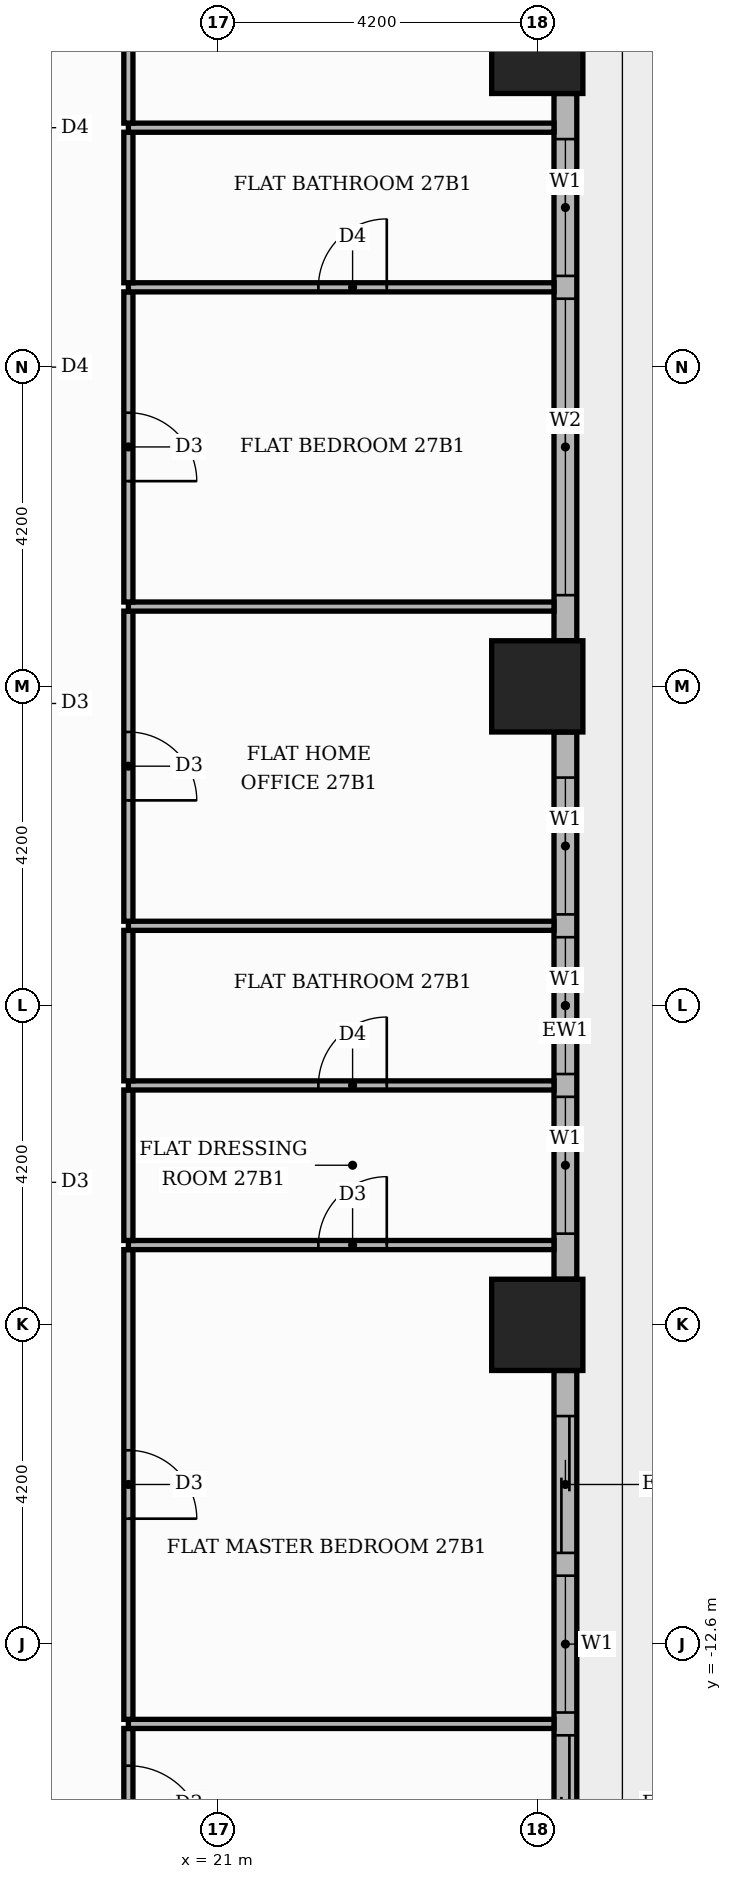
"""IFC4 building model, lengths in metres.
Left out: names, types, materials, properties, quantities, classifications, styles, units other than length and angle.
Written with IfcOpenShell. Run it as: python <this file> out.ifc"""

import sys

from ifc_helpers import new_model, si_unit, direction, frame, frame_2d, origin, origin_2d, place, context, subcontext, project, spatial, rectangle, extrude, element, fill, save


model = new_model("IFC4")
c1 = context("Model", 3, precision=1e-05, world=origin(), true_north=direction((0.0, 1.0)))
c2 = subcontext(c1, "Body", "Model", "MODEL_VIEW")
j1 = project(units=[si_unit("LENGTHUNIT", "METRE"), si_unit("PLANEANGLEUNIT", "RADIAN")], contexts=[c1])
p1 = place(None, origin())
s1 = spatial("IfcSite", under=j1, at=p1, CompositionType="ELEMENT")
p2 = place(p1, origin())
s2 = spatial("IfcBuilding", under=s1, at=p2, CompositionType="ELEMENT")
p3 = place(p2, frame((0.0, 0.0, 114.3)))
s3 = spatial("IfcBuildingStorey", under=s2, at=p3, CompositionType="ELEMENT", Elevation=114.3)
for number, where, z_axis, x_axis in (
    (1, (25.2, 0.0, 0.0), (0.0, 0.0, 1.0), (1.0, 0.0, 0.0)),
    (2, (25.2, 8.4, 0.0), (0.0, 0.0, 1.0), (1.0, 0.0, 0.0)),
    (3, (25.2, -8.4, 0.0), (0.0, 0.0, 1.0), (1.0, 0.0, 0.0)),
):
    element("IfcColumn", number, at=place(p3, frame(where, z_axis=z_axis, x_axis=x_axis)), inside=s3, PredefinedType="COLUMN", context=c2, shape_type="SweptSolid", body=[
        extrude(rectangle(XDim=1.2, YDim=1.2, at=origin_2d()), origin(), (0.0, 0.0, 1.0), 3.9),
    ])
p4 = place(p3, frame((25.57, -16.2, 0.0), z_axis=(0.0, 0.0, 1.0), x_axis=(0.0, 1.0, 0.0)))
e4 = element("IfcWall", 4, at=p4, inside=s3, PredefinedType="STANDARD", context=c2, shape_type="SweptSolid", body=[
    extrude(rectangle(XDim=7.2, YDim=0.3, at=frame_2d((3.6, 0.0))), origin(), (0.0, 0.0, 1.0), 3.48),
])
p5 = place(p4, frame((0.6, 0.0, 0.0)))
e5 = element("IfcOpeningElement", 5, at=p5, cuts=e4, PredefinedType="OPENING", context=c2, shape_type="SweptSolid", body=[
    extrude(rectangle(XDim=1.8, YDim=2.4, at=frame_2d((0.9, 1.2))), frame((0.0, 0.16, 0.0), z_axis=(0.0, -1.0, 0.0), x_axis=(1.0, 0.0, 0.0)), (0.0, 0.0, 1.0), 0.32),
])
p6 = place(p4, frame((2.7, 0.0, 0.9)))
e6 = element("IfcOpeningElement", 6, at=p6, cuts=e4, PredefinedType="OPENING", context=c2, shape_type="SweptSolid", body=[
    extrude(rectangle(XDim=1.8, YDim=2.1, at=frame_2d((0.9, 1.05))), frame((0.0, 0.16, 0.0), z_axis=(0.0, -1.0, 0.0), x_axis=(1.0, 0.0, 0.0)), (0.0, 0.0, 1.0), 0.32),
])
p7 = place(p4, frame((4.8, 0.0, 0.0)))
e7 = element("IfcOpeningElement", 7, at=p7, cuts=e4, PredefinedType="OPENING", context=c2, shape_type="SweptSolid", body=[
    extrude(rectangle(XDim=1.8, YDim=2.4, at=frame_2d((0.9, 1.2))), frame((0.0, 0.16, 0.0), z_axis=(0.0, -1.0, 0.0), x_axis=(1.0, 0.0, 0.0)), (0.0, 0.0, 1.0), 0.32),
])
p8 = place(p3, frame((25.57, -7.8, 0.0), z_axis=(0.0, 0.0, 1.0), x_axis=(0.0, 1.0, 0.0)))
e8 = element("IfcWall", 8, at=p8, inside=s3, PredefinedType="STANDARD", context=c2, shape_type="SweptSolid", body=[
    extrude(rectangle(XDim=7.2, YDim=0.3, at=frame_2d((3.6, 0.0))), origin(), (0.0, 0.0, 1.0), 3.48),
])
p9 = place(p8, frame((0.6, 0.0, 0.9)))
e9 = element("IfcOpeningElement", 9, at=p9, cuts=e8, PredefinedType="OPENING", context=c2, shape_type="SweptSolid", body=[
    extrude(rectangle(XDim=1.8, YDim=2.1, at=frame_2d((0.9, 1.05))), frame((0.0, 0.16, 0.0), z_axis=(0.0, -1.0, 0.0), x_axis=(1.0, 0.0, 0.0)), (0.0, 0.0, 1.0), 0.32),
])
p10 = place(p8, frame((2.7, 0.0, 0.9)))
e10 = element("IfcOpeningElement", 10, at=p10, cuts=e8, PredefinedType="OPENING", context=c2, shape_type="SweptSolid", body=[
    extrude(rectangle(XDim=1.8, YDim=2.1, at=frame_2d((0.9, 1.05))), frame((0.0, 0.16, 0.0), z_axis=(0.0, -1.0, 0.0), x_axis=(1.0, 0.0, 0.0)), (0.0, 0.0, 1.0), 0.32),
])
p11 = place(p8, frame((4.8, 0.0, 0.9)))
e11 = element("IfcOpeningElement", 11, at=p11, cuts=e8, PredefinedType="OPENING", context=c2, shape_type="SweptSolid", body=[
    extrude(rectangle(XDim=1.8, YDim=2.1, at=frame_2d((0.9, 1.05))), frame((0.0, 0.16, 0.0), z_axis=(0.0, -1.0, 0.0), x_axis=(1.0, 0.0, 0.0)), (0.0, 0.0, 1.0), 0.32),
])
p12 = place(p3, frame((25.57, 0.6, 0.0), z_axis=(0.0, 0.0, 1.0), x_axis=(0.0, 1.0, 0.0)))
e12 = element("IfcWall", 12, at=p12, inside=s3, PredefinedType="STANDARD", context=c2, shape_type="SweptSolid", body=[
    extrude(rectangle(XDim=7.2, YDim=0.3, at=frame_2d((3.6, 0.0))), origin(), (0.0, 0.0, 1.0), 3.48),
])
p13 = place(p12, frame((0.6, 0.0, 0.9)))
e13 = element("IfcOpeningElement", 13, at=p13, cuts=e12, PredefinedType="OPENING", context=c2, shape_type="SweptSolid", body=[
    extrude(rectangle(XDim=3.9, YDim=2.1, at=frame_2d((1.95, 1.05))), frame((0.0, 0.16, 0.0), z_axis=(0.0, -1.0, 0.0), x_axis=(1.0, 0.0, 0.0)), (0.0, 0.0, 1.0), 0.32),
])
p14 = place(p12, frame((4.8, 0.0, 0.9)))
e14 = element("IfcOpeningElement", 14, at=p14, cuts=e12, PredefinedType="OPENING", context=c2, shape_type="SweptSolid", body=[
    extrude(rectangle(XDim=1.8, YDim=2.1, at=frame_2d((0.9, 1.05))), frame((0.0, 0.16, 0.0), z_axis=(0.0, -1.0, 0.0), x_axis=(1.0, 0.0, 0.0)), (0.0, 0.0, 1.0), 0.32),
])
p15 = place(p3, frame((19.82, -15.69, 0.0), z_axis=(0.0, 0.0, 1.0), x_axis=(0.0, 1.0, 0.0)))
e15 = element("IfcWall", 15, at=p15, inside=s3, PredefinedType="PARTITIONING", context=c2, shape_type="SweptSolid", body=[
    extrude(rectangle(XDim=1.98, YDim=0.12, at=frame_2d((0.99, 0.0))), origin(), (0.0, 0.0, 1.0), 3.48),
])
p16 = place(p15, frame((0.49, 0.0, 0.0)))
e16 = element("IfcOpeningElement", 16, at=p16, cuts=e15, PredefinedType="OPENING", context=c2, shape_type="SweptSolid", body=[
    extrude(rectangle(XDim=1.0, YDim=2.1, at=frame_2d((0.5, 1.05))), frame((0.0, 0.07, 0.0), z_axis=(0.0, -1.0, 0.0), x_axis=(1.0, 0.0, 0.0)), (0.0, 0.0, 1.0), 0.14),
])
p17 = place(p3, frame((19.82, -13.65, 0.0), z_axis=(0.0, 0.0, 1.0), x_axis=(1.0, 0.0, 0.0)))
e17 = element("IfcWall", 17, at=p17, inside=s3, PredefinedType="PARTITIONING", context=c2, shape_type="SweptSolid", body=[
    extrude(rectangle(XDim=5.6, YDim=0.12, at=frame_2d((2.8, 0.0))), origin(), (0.0, 0.0, 1.0), 3.48),
])
p18 = place(p3, frame((19.82, -13.59, 0.0), z_axis=(0.0, 0.0, 1.0), x_axis=(0.0, 1.0, 0.0)))
e18 = element("IfcWall", 18, at=p18, inside=s3, PredefinedType="PARTITIONING", context=c2, shape_type="SweptSolid", body=[
    extrude(rectangle(XDim=6.18, YDim=0.12, at=frame_2d((3.09, 0.0))), origin(), (0.0, 0.0, 1.0), 3.48),
])
p19 = place(p18, frame((2.64, 0.0, 0.0)))
e19 = element("IfcOpeningElement", 19, at=p19, cuts=e18, PredefinedType="OPENING", context=c2, shape_type="SweptSolid", body=[
    extrude(rectangle(XDim=0.9, YDim=2.1, at=frame_2d((0.45, 1.05))), frame((0.0, 0.07, 0.0), z_axis=(0.0, -1.0, 0.0), x_axis=(1.0, 0.0, 0.0)), (0.0, 0.0, 1.0), 0.14),
])
p20 = place(p3, frame((19.82, -7.35, 0.0), z_axis=(0.0, 0.0, 1.0), x_axis=(1.0, 0.0, 0.0)))
e20 = element("IfcWall", 20, at=p20, inside=s3, PredefinedType="PARTITIONING", context=c2, shape_type="SweptSolid", body=[
    extrude(rectangle(XDim=5.6, YDim=0.12, at=frame_2d((2.8, 0.0))), origin(), (0.0, 0.0, 1.0), 3.48),
])
p21 = place(p20, frame((2.5, 0.0, 0.0)))
e21 = element("IfcOpeningElement", 21, at=p21, cuts=e20, PredefinedType="OPENING", context=c2, shape_type="SweptSolid", body=[
    extrude(rectangle(XDim=0.9, YDim=2.1, at=frame_2d((0.45, 1.05))), frame((0.0, 0.07, 0.0), z_axis=(0.0, -1.0, 0.0), x_axis=(1.0, 0.0, 0.0)), (0.0, 0.0, 1.0), 0.14),
])
p22 = place(p3, frame((19.82, -7.29, 0.0), z_axis=(0.0, 0.0, 1.0), x_axis=(0.0, 1.0, 0.0)))
e22 = element("IfcWall", 22, at=p22, inside=s3, PredefinedType="PARTITIONING", context=c2, shape_type="SweptSolid", body=[
    extrude(rectangle(XDim=1.98, YDim=0.12, at=frame_2d((0.99, 0.0))), origin(), (0.0, 0.0, 1.0), 3.48),
])
p23 = place(p3, frame((19.82, -5.25, 0.0), z_axis=(0.0, 0.0, 1.0), x_axis=(1.0, 0.0, 0.0)))
e23 = element("IfcWall", 23, at=p23, inside=s3, PredefinedType="PARTITIONING", context=c2, shape_type="SweptSolid", body=[
    extrude(rectangle(XDim=5.6, YDim=0.12, at=frame_2d((2.8, 0.0))), origin(), (0.0, 0.0, 1.0), 3.48),
])
p24 = place(p23, frame((2.5, 0.0, 0.0)))
e24 = element("IfcOpeningElement", 24, at=p24, cuts=e23, PredefinedType="OPENING", context=c2, shape_type="SweptSolid", body=[
    extrude(rectangle(XDim=0.9, YDim=2.1, at=frame_2d((0.45, 1.05))), frame((0.0, 0.07, 0.0), z_axis=(0.0, -1.0, 0.0), x_axis=(1.0, 0.0, 0.0)), (0.0, 0.0, 1.0), 0.14),
])
p25 = place(p3, frame((19.82, -5.19, 0.0), z_axis=(0.0, 0.0, 1.0), x_axis=(0.0, 1.0, 0.0)))
e25 = element("IfcWall", 25, at=p25, inside=s3, PredefinedType="PARTITIONING", context=c2, shape_type="SweptSolid", body=[
    extrude(rectangle(XDim=1.98, YDim=0.12, at=frame_2d((0.99, 0.0))), origin(), (0.0, 0.0, 1.0), 3.48),
])
p26 = place(p3, frame((19.82, -3.15, 0.0), z_axis=(0.0, 0.0, 1.0), x_axis=(1.0, 0.0, 0.0)))
e26 = element("IfcWall", 26, at=p26, inside=s3, PredefinedType="PARTITIONING", context=c2, shape_type="SweptSolid", body=[
    extrude(rectangle(XDim=5.6, YDim=0.12, at=frame_2d((2.8, 0.0))), origin(), (0.0, 0.0, 1.0), 3.48),
])
p27 = place(p3, frame((19.82, -3.09, 0.0), z_axis=(0.0, 0.0, 1.0), x_axis=(0.0, 1.0, 0.0)))
e27 = element("IfcWall", 27, at=p27, inside=s3, PredefinedType="PARTITIONING", context=c2, shape_type="SweptSolid", body=[
    extrude(rectangle(XDim=4.08, YDim=0.12, at=frame_2d((2.04, 0.0))), origin(), (0.0, 0.0, 1.0), 3.48),
])
p28 = place(p27, frame((1.59, 0.0, 0.0)))
e28 = element("IfcOpeningElement", 28, at=p28, cuts=e27, PredefinedType="OPENING", context=c2, shape_type="SweptSolid", body=[
    extrude(rectangle(XDim=0.9, YDim=2.1, at=frame_2d((0.45, 1.05))), frame((0.0, 0.07, 0.0), z_axis=(0.0, -1.0, 0.0), x_axis=(1.0, 0.0, 0.0)), (0.0, 0.0, 1.0), 0.14),
])
p29 = place(p3, frame((19.82, 1.05, 0.0), z_axis=(0.0, 0.0, 1.0), x_axis=(1.0, 0.0, 0.0)))
e29 = element("IfcWall", 29, at=p29, inside=s3, PredefinedType="PARTITIONING", context=c2, shape_type="SweptSolid", body=[
    extrude(rectangle(XDim=5.6, YDim=0.12, at=frame_2d((2.8, 0.0))), origin(), (0.0, 0.0, 1.0), 3.48),
])
p30 = place(p3, frame((19.82, 1.11, 0.0), z_axis=(0.0, 0.0, 1.0), x_axis=(0.0, 1.0, 0.0)))
e30 = element("IfcWall", 30, at=p30, inside=s3, PredefinedType="PARTITIONING", context=c2, shape_type="SweptSolid", body=[
    extrude(rectangle(XDim=4.08, YDim=0.12, at=frame_2d((2.04, 0.0))), origin(), (0.0, 0.0, 1.0), 3.48),
])
p31 = place(p30, frame((1.59, 0.0, 0.0)))
e31 = element("IfcOpeningElement", 31, at=p31, cuts=e30, PredefinedType="OPENING", context=c2, shape_type="SweptSolid", body=[
    extrude(rectangle(XDim=0.9, YDim=2.1, at=frame_2d((0.45, 1.05))), frame((0.0, 0.07, 0.0), z_axis=(0.0, -1.0, 0.0), x_axis=(1.0, 0.0, 0.0)), (0.0, 0.0, 1.0), 0.14),
])
p32 = place(p3, frame((19.82, 5.25, 0.0), z_axis=(0.0, 0.0, 1.0), x_axis=(1.0, 0.0, 0.0)))
e32 = element("IfcWall", 32, at=p32, inside=s3, PredefinedType="PARTITIONING", context=c2, shape_type="SweptSolid", body=[
    extrude(rectangle(XDim=5.6, YDim=0.12, at=frame_2d((2.8, 0.0))), origin(), (0.0, 0.0, 1.0), 3.48),
])
p33 = place(p32, frame((2.5, 0.0, 0.0)))
e33 = element("IfcOpeningElement", 33, at=p33, cuts=e32, PredefinedType="OPENING", context=c2, shape_type="SweptSolid", body=[
    extrude(rectangle(XDim=0.9, YDim=2.1, at=frame_2d((0.45, 1.05))), frame((0.0, 0.07, 0.0), z_axis=(0.0, -1.0, 0.0), x_axis=(1.0, 0.0, 0.0)), (0.0, 0.0, 1.0), 0.14),
])
p34 = place(p3, frame((19.82, 5.31, 0.0), z_axis=(0.0, 0.0, 1.0), x_axis=(0.0, 1.0, 0.0)))
e34 = element("IfcWall", 34, at=p34, inside=s3, PredefinedType="PARTITIONING", context=c2, shape_type="SweptSolid", body=[
    extrude(rectangle(XDim=1.98, YDim=0.12, at=frame_2d((0.99, 0.0))), origin(), (0.0, 0.0, 1.0), 3.48),
])
p35 = place(p3, frame((19.82, 7.35, 0.0), z_axis=(0.0, 0.0, 1.0), x_axis=(1.0, 0.0, 0.0)))
e35 = element("IfcWall", 35, at=p35, inside=s3, PredefinedType="PARTITIONING", context=c2, shape_type="SweptSolid", body=[
    extrude(rectangle(XDim=5.6, YDim=0.12, at=frame_2d((2.8, 0.0))), origin(), (0.0, 0.0, 1.0), 3.48),
])
p36 = place(p3, frame((19.82, 7.41, 0.0), z_axis=(0.0, 0.0, 1.0), x_axis=(0.0, 1.0, 0.0)))
e36 = element("IfcWall", 36, at=p36, inside=s3, PredefinedType="PARTITIONING", context=c2, shape_type="SweptSolid", body=[
    extrude(rectangle(XDim=4.08, YDim=0.12, at=frame_2d((2.04, 0.0))), origin(), (0.0, 0.0, 1.0), 3.48),
])
p37 = place(p36, frame((1.59, 0.0, 0.0)))
e37 = element("IfcOpeningElement", 37, at=p37, cuts=e36, PredefinedType="OPENING", context=c2, shape_type="SweptSolid", body=[
    extrude(rectangle(XDim=0.9, YDim=2.1, at=frame_2d((0.45, 1.05))), frame((0.0, 0.07, 0.0), z_axis=(0.0, -1.0, 0.0), x_axis=(1.0, 0.0, 0.0)), (0.0, 0.0, 1.0), 0.14),
])
p38 = place(p5, origin())
e38 = element("IfcDoor", 38, at=p38, inside=s3, OperationType="SLIDING_TO_LEFT", PredefinedType="DOOR", context=c2, shape_type="SweptSolid", body=[
    extrude(rectangle(XDim=1.8, YDim=2.4, at=frame_2d((0.9, 1.2))), frame((0.0, 0.025, 0.0), z_axis=(0.0, -1.0, 0.0), x_axis=(1.0, 0.0, 0.0)), (0.0, 0.0, 1.0), 0.05),
])
fill(e5, e38)
p39 = place(p6, origin())
e39 = element("IfcWindow", 39, at=p39, inside=s3, PartitioningType="SINGLE_PANEL", PredefinedType="WINDOW", context=c2, shape_type="SweptSolid", body=[
    extrude(rectangle(XDim=1.8, YDim=2.1, at=frame_2d((0.9, 1.05))), frame((0.0, 0.03, 0.0), z_axis=(0.0, -1.0, 0.0), x_axis=(1.0, 0.0, 0.0)), (0.0, 0.0, 1.0), 0.06),
])
fill(e6, e39)
p40 = place(p7, origin())
e40 = element("IfcDoor", 40, at=p40, inside=s3, OperationType="SLIDING_TO_RIGHT", PredefinedType="DOOR", context=c2, shape_type="SweptSolid", body=[
    extrude(rectangle(XDim=1.8, YDim=2.4, at=frame_2d((0.9, 1.2))), frame((0.0, 0.025, 0.0), z_axis=(0.0, -1.0, 0.0), x_axis=(1.0, 0.0, 0.0)), (0.0, 0.0, 1.0), 0.05),
])
fill(e7, e40)
p41 = place(p9, origin())
e41 = element("IfcWindow", 41, at=p41, inside=s3, PartitioningType="SINGLE_PANEL", PredefinedType="WINDOW", context=c2, shape_type="SweptSolid", body=[
    extrude(rectangle(XDim=1.8, YDim=2.1, at=frame_2d((0.9, 1.05))), frame((0.0, 0.03, 0.0), z_axis=(0.0, -1.0, 0.0), x_axis=(1.0, 0.0, 0.0)), (0.0, 0.0, 1.0), 0.06),
])
fill(e9, e41)
p42 = place(p10, origin())
e42 = element("IfcWindow", 42, at=p42, inside=s3, PartitioningType="SINGLE_PANEL", PredefinedType="WINDOW", context=c2, shape_type="SweptSolid", body=[
    extrude(rectangle(XDim=1.8, YDim=2.1, at=frame_2d((0.9, 1.05))), frame((0.0, 0.03, 0.0), z_axis=(0.0, -1.0, 0.0), x_axis=(1.0, 0.0, 0.0)), (0.0, 0.0, 1.0), 0.06),
])
fill(e10, e42)
p43 = place(p11, origin())
e43 = element("IfcWindow", 43, at=p43, inside=s3, PartitioningType="SINGLE_PANEL", PredefinedType="WINDOW", context=c2, shape_type="SweptSolid", body=[
    extrude(rectangle(XDim=1.8, YDim=2.1, at=frame_2d((0.9, 1.05))), frame((0.0, 0.03, 0.0), z_axis=(0.0, -1.0, 0.0), x_axis=(1.0, 0.0, 0.0)), (0.0, 0.0, 1.0), 0.06),
])
fill(e11, e43)
p44 = place(p13, origin())
e44 = element("IfcWindow", 44, at=p44, inside=s3, PartitioningType="SINGLE_PANEL", PredefinedType="WINDOW", context=c2, shape_type="SweptSolid", body=[
    extrude(rectangle(XDim=3.9, YDim=2.1, at=frame_2d((1.95, 1.05))), frame((0.0, 0.03, 0.0), z_axis=(0.0, -1.0, 0.0), x_axis=(1.0, 0.0, 0.0)), (0.0, 0.0, 1.0), 0.06),
])
fill(e13, e44)
p45 = place(p14, origin())
e45 = element("IfcWindow", 45, at=p45, inside=s3, PartitioningType="SINGLE_PANEL", PredefinedType="WINDOW", context=c2, shape_type="SweptSolid", body=[
    extrude(rectangle(XDim=1.8, YDim=2.1, at=frame_2d((0.9, 1.05))), frame((0.0, 0.03, 0.0), z_axis=(0.0, -1.0, 0.0), x_axis=(1.0, 0.0, 0.0)), (0.0, 0.0, 1.0), 0.06),
])
fill(e14, e45)
p46 = place(p16, frame((1.0, 0.0, 0.0), z_axis=(0.0, 0.0, 1.0), x_axis=(-1.0, 0.0, 0.0)))
e46 = element("IfcDoor", 46, at=p46, inside=s3, OperationType="SINGLE_SWING_LEFT", PredefinedType="DOOR", context=c2, shape_type="SweptSolid", body=[
    extrude(rectangle(XDim=1.0, YDim=2.1, at=frame_2d((0.5, 1.05))), frame((0.0, 0.025, 0.0), z_axis=(0.0, -1.0, 0.0), x_axis=(1.0, 0.0, 0.0)), (0.0, 0.0, 1.0), 0.05),
])
fill(e16, e46)
p47 = place(p19, frame((0.9, 0.0, 0.0), z_axis=(0.0, 0.0, 1.0), x_axis=(-1.0, 0.0, 0.0)))
e47 = element("IfcDoor", 47, at=p47, inside=s3, OperationType="SINGLE_SWING_LEFT", PredefinedType="DOOR", context=c2, shape_type="SweptSolid", body=[
    extrude(rectangle(XDim=0.9, YDim=2.1, at=frame_2d((0.45, 1.05))), frame((0.0, 0.025, 0.0), z_axis=(0.0, -1.0, 0.0), x_axis=(1.0, 0.0, 0.0)), (0.0, 0.0, 1.0), 0.05),
])
fill(e19, e47)
p48 = place(p21, origin())
e48 = element("IfcDoor", 48, at=p48, inside=s3, OperationType="SINGLE_SWING_RIGHT", PredefinedType="DOOR", context=c2, shape_type="SweptSolid", body=[
    extrude(rectangle(XDim=0.9, YDim=2.1, at=frame_2d((0.45, 1.05))), frame((0.0, 0.025, 0.0), z_axis=(0.0, -1.0, 0.0), x_axis=(1.0, 0.0, 0.0)), (0.0, 0.0, 1.0), 0.05),
])
fill(e21, e48)
p49 = place(p24, origin())
e49 = element("IfcDoor", 49, at=p49, inside=s3, OperationType="SINGLE_SWING_RIGHT", PredefinedType="DOOR", context=c2, shape_type="SweptSolid", body=[
    extrude(rectangle(XDim=0.9, YDim=2.1, at=frame_2d((0.45, 1.05))), frame((0.0, 0.025, 0.0), z_axis=(0.0, -1.0, 0.0), x_axis=(1.0, 0.0, 0.0)), (0.0, 0.0, 1.0), 0.05),
])
fill(e24, e49)
p50 = place(p28, frame((0.9, 0.0, 0.0), z_axis=(0.0, 0.0, 1.0), x_axis=(-1.0, 0.0, 0.0)))
e50 = element("IfcDoor", 50, at=p50, inside=s3, OperationType="SINGLE_SWING_LEFT", PredefinedType="DOOR", context=c2, shape_type="SweptSolid", body=[
    extrude(rectangle(XDim=0.9, YDim=2.1, at=frame_2d((0.45, 1.05))), frame((0.0, 0.025, 0.0), z_axis=(0.0, -1.0, 0.0), x_axis=(1.0, 0.0, 0.0)), (0.0, 0.0, 1.0), 0.05),
])
fill(e28, e50)
p51 = place(p31, frame((0.9, 0.0, 0.0), z_axis=(0.0, 0.0, 1.0), x_axis=(-1.0, 0.0, 0.0)))
e51 = element("IfcDoor", 51, at=p51, inside=s3, OperationType="SINGLE_SWING_LEFT", PredefinedType="DOOR", context=c2, shape_type="SweptSolid", body=[
    extrude(rectangle(XDim=0.9, YDim=2.1, at=frame_2d((0.45, 1.05))), frame((0.0, 0.025, 0.0), z_axis=(0.0, -1.0, 0.0), x_axis=(1.0, 0.0, 0.0)), (0.0, 0.0, 1.0), 0.05),
])
fill(e31, e51)
p52 = place(p33, origin())
e52 = element("IfcDoor", 52, at=p52, inside=s3, OperationType="SINGLE_SWING_RIGHT", PredefinedType="DOOR", context=c2, shape_type="SweptSolid", body=[
    extrude(rectangle(XDim=0.9, YDim=2.1, at=frame_2d((0.45, 1.05))), frame((0.0, 0.025, 0.0), z_axis=(0.0, -1.0, 0.0), x_axis=(1.0, 0.0, 0.0)), (0.0, 0.0, 1.0), 0.05),
])
fill(e33, e52)
save(model, sys.argv[1])
